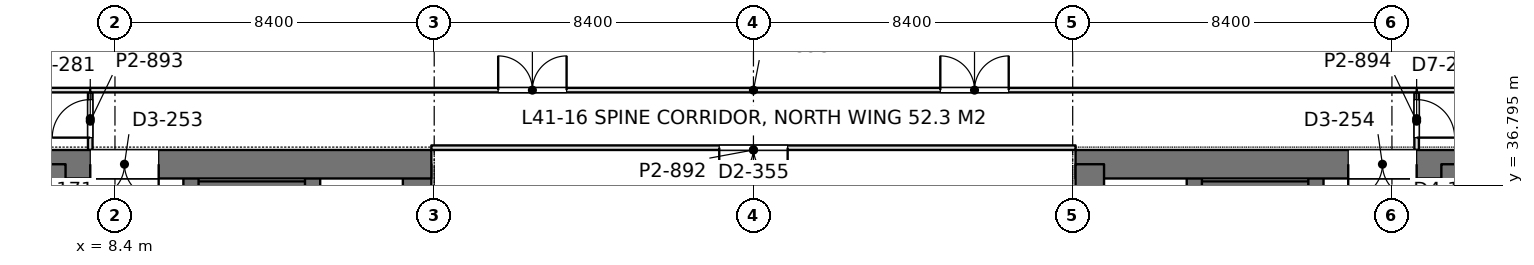
"""IFC4 building model, lengths in metres.
Left out: names, types, materials, properties, quantities, classifications, styles, units other than length and angle.
Written with IfcOpenShell. Run it as: python <this file> out.ifc"""

import sys

from ifc_helpers import new_model, si_unit, direction, frame, frame_2d, origin, place, context, subcontext, project, spatial, rectangle, extrude, element, fill, save


model = new_model("IFC4")
c1 = context("Model", 3, precision=1e-05, world=origin(), true_north=direction((0.0, 1.0)))
c2 = subcontext(c1, "Body", "Model", "MODEL_VIEW")
j1 = project(units=[si_unit("LENGTHUNIT", "METRE"), si_unit("PLANEANGLEUNIT", "RADIAN")], contexts=[c1])
p1 = place(None, origin())
s1 = spatial("IfcSite", under=j1, at=p1, CompositionType="ELEMENT")
p2 = place(p1, origin())
s2 = spatial("IfcBuilding", under=s1, at=p2, CompositionType="ELEMENT")
p3 = place(p2, frame((0.0, 0.0, 181.8)))
s3 = spatial("IfcBuildingStorey", under=s2, at=p3, CompositionType="ELEMENT", Elevation=181.8)
p4 = place(p3, frame((-1.125, 37.35, 0.0), z_axis=(0.0, 0.0, 1.0), x_axis=(1.0, 0.0, 0.0)))
e1 = element("IfcWall", 1, at=p4, inside=s3, PredefinedType="SHEAR", context=c2, shape_type="SweptSolid", body=[
    extrude(rectangle(XDim=17.85, YDim=0.75, at=frame_2d((8.925, 0.0))), origin(), (0.0, 0.0, 1.0), 4.2),
])
p5 = place(p4, frame((8.875, 0.0, 0.0)))
e2 = element("IfcOpeningElement", 2, at=p5, cuts=e1, PredefinedType="OPENING", context=c2, shape_type="SweptSolid", body=[
    extrude(rectangle(XDim=1.8, YDim=2.4, at=frame_2d((0.9, 1.2))), frame((0.0, 0.385, 0.0), z_axis=(0.0, -1.0, 0.0), x_axis=(1.0, 0.0, 0.0)), (0.0, 0.0, 1.0), 0.77),
])
p6 = place(p3, frame((16.35, 27.8, 0.0), z_axis=(0.0, 0.0, 1.0), x_axis=(0.0, 1.0, 0.0)))
e3 = element("IfcWall", 3, at=p6, inside=s3, PredefinedType="SHEAR", context=c2, shape_type="SweptSolid", body=[
    extrude(rectangle(XDim=9.55, YDim=0.75, at=frame_2d((4.775, 0.0))), origin(), (0.0, 0.0, 1.0), 4.2),
])
p7 = place(p3, frame((6.9, 13.05, 0.0), z_axis=(0.0, 0.0, 1.0), x_axis=(0.0, 1.0, 0.0)))
e4 = element("IfcWall", 4, at=p7, inside=s3, PredefinedType="SHEAR", context=c2, shape_type="SweptSolid", body=[
    extrude(rectangle(XDim=24.3, YDim=0.4, at=frame_2d((12.15, 0.0))), origin(), (0.0, 0.0, 1.0), 4.2),
])
p8 = place(p7, frame((1.3, 0.0, 0.0)))
e5 = element("IfcOpeningElement", 5, at=p8, cuts=e4, PredefinedType="OPENING", context=c2, shape_type="SweptSolid", body=[
    extrude(rectangle(XDim=1.0, YDim=2.2, at=frame_2d((0.5, 1.1))), frame((0.0, 0.21, 0.0), z_axis=(0.0, -1.0, 0.0), x_axis=(1.0, 0.0, 0.0)), (0.0, 0.0, 1.0), 0.42),
])
p9 = place(p7, frame((22.0, 0.0, 0.0)))
e6 = element("IfcOpeningElement", 6, at=p9, cuts=e4, PredefinedType="OPENING", context=c2, shape_type="SweptSolid", body=[
    extrude(rectangle(XDim=1.0, YDim=2.2, at=frame_2d((0.5, 1.1))), frame((0.0, 0.21, 0.0), z_axis=(0.0, -1.0, 0.0), x_axis=(1.0, 0.0, 0.0)), (0.0, 0.0, 1.0), 0.42),
])
p10 = place(p7, frame((5.55, 0.0, 0.0)))
e7 = element("IfcOpeningElement", 7, at=p10, cuts=e4, PredefinedType="OPENING", context=c2, shape_type="SweptSolid", body=[
    extrude(rectangle(XDim=1.0, YDim=2.2, at=frame_2d((0.5, 1.1))), frame((0.0, 0.21, 0.0), z_axis=(0.0, -1.0, 0.0), x_axis=(1.0, 0.0, 0.0)), (0.0, 0.0, 1.0), 0.42),
])
p11 = place(p7, frame((9.55, 0.0, 0.0)))
e8 = element("IfcOpeningElement", 8, at=p11, cuts=e4, PredefinedType="OPENING", context=c2, shape_type="SweptSolid", body=[
    extrude(rectangle(XDim=1.0, YDim=2.2, at=frame_2d((0.5, 1.1))), frame((0.0, 0.21, 0.0), z_axis=(0.0, -1.0, 0.0), x_axis=(1.0, 0.0, 0.0)), (0.0, 0.0, 1.0), 0.42),
])
p12 = place(p7, frame((12.8, 0.0, 0.0)))
e9 = element("IfcOpeningElement", 9, at=p12, cuts=e4, PredefinedType="OPENING", context=c2, shape_type="SweptSolid", body=[
    extrude(rectangle(XDim=1.1, YDim=2.2, at=frame_2d((0.55, 1.1))), frame((0.0, 0.21, 0.0), z_axis=(0.0, -1.0, 0.0), x_axis=(1.0, 0.0, 0.0)), (0.0, 0.0, 1.0), 0.42),
])
p13 = place(p7, frame((15.538, 0.0, 0.0)))
e10 = element("IfcOpeningElement", 10, at=p13, cuts=e4, PredefinedType="OPENING", context=c2, shape_type="SweptSolid", body=[
    extrude(rectangle(XDim=1.1, YDim=2.2, at=frame_2d((0.55, 1.1))), frame((0.0, 0.21, 0.0), z_axis=(0.0, -1.0, 0.0), x_axis=(1.0, 0.0, 0.0)), (0.0, 0.0, 1.0), 0.42),
])
p14 = place(p7, frame((18.262, 0.0, 0.0)))
e11 = element("IfcOpeningElement", 11, at=p14, cuts=e4, PredefinedType="OPENING", context=c2, shape_type="SweptSolid", body=[
    extrude(rectangle(XDim=1.1, YDim=2.2, at=frame_2d((0.55, 1.1))), frame((0.0, 0.21, 0.0), z_axis=(0.0, -1.0, 0.0), x_axis=(1.0, 0.0, 0.0)), (0.0, 0.0, 1.0), 0.42),
])
p15 = place(p3, frame((10.4, 13.05, 0.0), z_axis=(0.0, 0.0, 1.0), x_axis=(0.0, 1.0, 0.0)))
e12 = element("IfcWall", 12, at=p15, inside=s3, PredefinedType="SHEAR", context=c2, shape_type="SweptSolid", body=[
    extrude(rectangle(XDim=24.3, YDim=0.4, at=frame_2d((12.15, 0.0))), origin(), (0.0, 0.0, 1.0), 4.2),
])
p16 = place(p15, frame((15.75, 0.0, 0.0)))
e13 = element("IfcOpeningElement", 13, at=p16, cuts=e12, PredefinedType="OPENING", context=c2, shape_type="SweptSolid", body=[
    extrude(rectangle(XDim=1.1, YDim=2.2, at=frame_2d((0.55, 1.1))), frame((0.0, 0.21, 0.0), z_axis=(0.0, -1.0, 0.0), x_axis=(1.0, 0.0, 0.0)), (0.0, 0.0, 1.0), 0.42),
])
p17 = place(p15, frame((18.6, 0.0, 0.0)))
e14 = element("IfcOpeningElement", 14, at=p17, cuts=e12, PredefinedType="OPENING", context=c2, shape_type="SweptSolid", body=[
    extrude(rectangle(XDim=1.1, YDim=2.2, at=frame_2d((0.55, 1.1))), frame((0.0, 0.21, 0.0), z_axis=(0.0, -1.0, 0.0), x_axis=(1.0, 0.0, 0.0)), (0.0, 0.0, 1.0), 0.42),
])
p18 = place(p15, frame((21.45, 0.0, 0.0)))
e15 = element("IfcOpeningElement", 15, at=p18, cuts=e12, PredefinedType="OPENING", context=c2, shape_type="SweptSolid", body=[
    extrude(rectangle(XDim=1.1, YDim=2.2, at=frame_2d((0.55, 1.1))), frame((0.0, 0.21, 0.0), z_axis=(0.0, -1.0, 0.0), x_axis=(1.0, 0.0, 0.0)), (0.0, 0.0, 1.0), 0.42),
])
p19 = place(p15, frame((8.65, 0.0, 0.0)))
e16 = element("IfcOpeningElement", 16, at=p19, cuts=e12, PredefinedType="OPENING", context=c2, shape_type="SweptSolid", body=[
    extrude(rectangle(XDim=1.8, YDim=2.4, at=frame_2d((0.9, 1.2))), frame((0.0, 0.21, 0.0), z_axis=(0.0, -1.0, 0.0), x_axis=(1.0, 0.0, 0.0)), (0.0, 0.0, 1.0), 0.42),
])
p20 = place(p3, frame((13.6, 27.925, 0.0), z_axis=(0.0, 0.0, 1.0), x_axis=(0.0, 1.0, 0.0)))
e17 = element("IfcWall", 17, at=p20, inside=s3, PredefinedType="SHEAR", context=c2, shape_type="SweptSolid", body=[
    extrude(rectangle(XDim=9.425, YDim=0.4, at=frame_2d((4.712, 0.0))), origin(), (0.0, 0.0, 1.0), 4.2),
])
p21 = place(p3, frame((10.4, 36.625, 0.0), z_axis=(0.0, 0.0, 1.0), x_axis=(1.0, 0.0, 0.0)))
e18 = element("IfcWall", 18, at=p21, inside=s3, PredefinedType="SHEAR", context=c2, shape_type="SweptSolid", body=[
    extrude(rectangle(XDim=3.2, YDim=0.55, at=frame_2d((1.6, 0.0))), origin(), (0.0, 0.0, 1.0), 4.2),
])
p22 = place(p3, frame((33.675, 37.35, 0.0), z_axis=(0.0, 0.0, 1.0), x_axis=(1.0, 0.0, 0.0)))
e19 = element("IfcWall", 19, at=p22, inside=s3, PredefinedType="SHEAR", context=c2, shape_type="SweptSolid", body=[
    extrude(rectangle(XDim=17.85, YDim=0.75, at=frame_2d((8.925, 0.0))), origin(), (0.0, 0.0, 1.0), 4.2),
])
p23 = place(p22, frame((7.175, 0.0, 0.0)))
e20 = element("IfcOpeningElement", 20, at=p23, cuts=e19, PredefinedType="OPENING", context=c2, shape_type="SweptSolid", body=[
    extrude(rectangle(XDim=1.8, YDim=2.4, at=frame_2d((0.9, 1.2))), frame((0.0, 0.385, 0.0), z_axis=(0.0, -1.0, 0.0), x_axis=(1.0, 0.0, 0.0)), (0.0, 0.0, 1.0), 0.77),
])
p24 = place(p3, frame((34.05, 27.8, 0.0), z_axis=(0.0, 0.0, 1.0), x_axis=(0.0, 1.0, 0.0)))
e21 = element("IfcWall", 21, at=p24, inside=s3, PredefinedType="SHEAR", context=c2, shape_type="SweptSolid", body=[
    extrude(rectangle(XDim=9.55, YDim=0.75, at=frame_2d((4.775, 0.0))), origin(), (0.0, 0.0, 1.0), 4.2),
])
p25 = place(p3, frame((43.5, 13.05, 0.0), z_axis=(0.0, 0.0, 1.0), x_axis=(0.0, 1.0, 0.0)))
e22 = element("IfcWall", 22, at=p25, inside=s3, PredefinedType="SHEAR", context=c2, shape_type="SweptSolid", body=[
    extrude(rectangle(XDim=24.3, YDim=0.4, at=frame_2d((12.15, 0.0))), origin(), (0.0, 0.0, 1.0), 4.2),
])
p26 = place(p25, frame((1.3, 0.0, 0.0)))
e23 = element("IfcOpeningElement", 23, at=p26, cuts=e22, PredefinedType="OPENING", context=c2, shape_type="SweptSolid", body=[
    extrude(rectangle(XDim=1.0, YDim=2.2, at=frame_2d((0.5, 1.1))), frame((0.0, 0.21, 0.0), z_axis=(0.0, -1.0, 0.0), x_axis=(1.0, 0.0, 0.0)), (0.0, 0.0, 1.0), 0.42),
])
p27 = place(p25, frame((22.0, 0.0, 0.0)))
e24 = element("IfcOpeningElement", 24, at=p27, cuts=e22, PredefinedType="OPENING", context=c2, shape_type="SweptSolid", body=[
    extrude(rectangle(XDim=1.0, YDim=2.2, at=frame_2d((0.5, 1.1))), frame((0.0, 0.21, 0.0), z_axis=(0.0, -1.0, 0.0), x_axis=(1.0, 0.0, 0.0)), (0.0, 0.0, 1.0), 0.42),
])
p28 = place(p25, frame((5.55, 0.0, 0.0)))
e25 = element("IfcOpeningElement", 25, at=p28, cuts=e22, PredefinedType="OPENING", context=c2, shape_type="SweptSolid", body=[
    extrude(rectangle(XDim=1.0, YDim=2.2, at=frame_2d((0.5, 1.1))), frame((0.0, 0.21, 0.0), z_axis=(0.0, -1.0, 0.0), x_axis=(1.0, 0.0, 0.0)), (0.0, 0.0, 1.0), 0.42),
])
p29 = place(p25, frame((9.55, 0.0, 0.0)))
e26 = element("IfcOpeningElement", 26, at=p29, cuts=e22, PredefinedType="OPENING", context=c2, shape_type="SweptSolid", body=[
    extrude(rectangle(XDim=1.0, YDim=2.2, at=frame_2d((0.5, 1.1))), frame((0.0, 0.21, 0.0), z_axis=(0.0, -1.0, 0.0), x_axis=(1.0, 0.0, 0.0)), (0.0, 0.0, 1.0), 0.42),
])
p30 = place(p25, frame((12.8, 0.0, 0.0)))
e27 = element("IfcOpeningElement", 27, at=p30, cuts=e22, PredefinedType="OPENING", context=c2, shape_type="SweptSolid", body=[
    extrude(rectangle(XDim=1.1, YDim=2.2, at=frame_2d((0.55, 1.1))), frame((0.0, 0.21, 0.0), z_axis=(0.0, -1.0, 0.0), x_axis=(1.0, 0.0, 0.0)), (0.0, 0.0, 1.0), 0.42),
])
p31 = place(p25, frame((15.538, 0.0, 0.0)))
e28 = element("IfcOpeningElement", 28, at=p31, cuts=e22, PredefinedType="OPENING", context=c2, shape_type="SweptSolid", body=[
    extrude(rectangle(XDim=1.1, YDim=2.2, at=frame_2d((0.55, 1.1))), frame((0.0, 0.21, 0.0), z_axis=(0.0, -1.0, 0.0), x_axis=(1.0, 0.0, 0.0)), (0.0, 0.0, 1.0), 0.42),
])
p32 = place(p25, frame((18.262, 0.0, 0.0)))
e29 = element("IfcOpeningElement", 29, at=p32, cuts=e22, PredefinedType="OPENING", context=c2, shape_type="SweptSolid", body=[
    extrude(rectangle(XDim=1.1, YDim=2.2, at=frame_2d((0.55, 1.1))), frame((0.0, 0.21, 0.0), z_axis=(0.0, -1.0, 0.0), x_axis=(1.0, 0.0, 0.0)), (0.0, 0.0, 1.0), 0.42),
])
p33 = place(p3, frame((40.0, 13.05, 0.0), z_axis=(0.0, 0.0, 1.0), x_axis=(0.0, 1.0, 0.0)))
e30 = element("IfcWall", 30, at=p33, inside=s3, PredefinedType="SHEAR", context=c2, shape_type="SweptSolid", body=[
    extrude(rectangle(XDim=24.3, YDim=0.4, at=frame_2d((12.15, 0.0))), origin(), (0.0, 0.0, 1.0), 4.2),
])
p34 = place(p33, frame((15.75, 0.0, 0.0)))
e31 = element("IfcOpeningElement", 31, at=p34, cuts=e30, PredefinedType="OPENING", context=c2, shape_type="SweptSolid", body=[
    extrude(rectangle(XDim=1.1, YDim=2.2, at=frame_2d((0.55, 1.1))), frame((0.0, 0.21, 0.0), z_axis=(0.0, -1.0, 0.0), x_axis=(1.0, 0.0, 0.0)), (0.0, 0.0, 1.0), 0.42),
])
p35 = place(p33, frame((18.6, 0.0, 0.0)))
e32 = element("IfcOpeningElement", 32, at=p35, cuts=e30, PredefinedType="OPENING", context=c2, shape_type="SweptSolid", body=[
    extrude(rectangle(XDim=1.1, YDim=2.2, at=frame_2d((0.55, 1.1))), frame((0.0, 0.21, 0.0), z_axis=(0.0, -1.0, 0.0), x_axis=(1.0, 0.0, 0.0)), (0.0, 0.0, 1.0), 0.42),
])
p36 = place(p33, frame((21.45, 0.0, 0.0)))
e33 = element("IfcOpeningElement", 33, at=p36, cuts=e30, PredefinedType="OPENING", context=c2, shape_type="SweptSolid", body=[
    extrude(rectangle(XDim=1.1, YDim=2.2, at=frame_2d((0.55, 1.1))), frame((0.0, 0.21, 0.0), z_axis=(0.0, -1.0, 0.0), x_axis=(1.0, 0.0, 0.0)), (0.0, 0.0, 1.0), 0.42),
])
p37 = place(p33, frame((8.65, 0.0, 0.0)))
e34 = element("IfcOpeningElement", 34, at=p37, cuts=e30, PredefinedType="OPENING", context=c2, shape_type="SweptSolid", body=[
    extrude(rectangle(XDim=1.8, YDim=2.4, at=frame_2d((0.9, 1.2))), frame((0.0, 0.21, 0.0), z_axis=(0.0, -1.0, 0.0), x_axis=(1.0, 0.0, 0.0)), (0.0, 0.0, 1.0), 0.42),
])
p38 = place(p3, frame((36.8, 27.925, 0.0), z_axis=(0.0, 0.0, 1.0), x_axis=(0.0, 1.0, 0.0)))
e35 = element("IfcWall", 35, at=p38, inside=s3, PredefinedType="SHEAR", context=c2, shape_type="SweptSolid", body=[
    extrude(rectangle(XDim=9.425, YDim=0.4, at=frame_2d((4.712, 0.0))), origin(), (0.0, 0.0, 1.0), 4.2),
])
p39 = place(p3, frame((40.0, 36.625, 0.0), z_axis=(0.0, 0.0, 1.0), x_axis=(-1.0, 0.0, 0.0)))
e36 = element("IfcWall", 36, at=p39, inside=s3, PredefinedType="SHEAR", context=c2, shape_type="SweptSolid", body=[
    extrude(rectangle(XDim=3.2, YDim=0.55, at=frame_2d((1.6, 0.0))), origin(), (0.0, 0.0, 1.0), 4.2),
])
p40 = place(p3, frame((7.748, 39.3, 0.0), z_axis=(0.0, 0.0, 1.0), x_axis=(1.0, 0.0, 0.0)))
e37 = element("IfcWall", 37, at=p40, inside=s3, PredefinedType="PARTITIONING", context=c2, shape_type="SweptSolid", body=[
    extrude(rectangle(XDim=34.904, YDim=0.12, at=frame_2d((17.452, 0.0))), origin(), (0.0, 0.0, 1.0), 3.55),
])
p41 = place(p40, frame((10.735, 0.0, 0.0)))
e38 = element("IfcOpeningElement", 38, at=p41, cuts=e37, PredefinedType="OPENING", context=c2, shape_type="SweptSolid", body=[
    extrude(rectangle(XDim=1.8, YDim=2.2, at=frame_2d((0.9, 1.1))), frame((0.0, 0.07, 0.0), z_axis=(0.0, -1.0, 0.0), x_axis=(1.0, 0.0, 0.0)), (0.0, 0.0, 1.0), 0.14),
])
p42 = place(p40, frame((22.369, 0.0, 0.0)))
e39 = element("IfcOpeningElement", 39, at=p42, cuts=e37, PredefinedType="OPENING", context=c2, shape_type="SweptSolid", body=[
    extrude(rectangle(XDim=1.8, YDim=2.2, at=frame_2d((0.9, 1.1))), frame((0.0, 0.07, 0.0), z_axis=(0.0, -1.0, 0.0), x_axis=(1.0, 0.0, 0.0)), (0.0, 0.0, 1.0), 0.14),
])
p43 = place(p3, frame((7.75, 37.724, 0.0), z_axis=(0.0, 0.0, 1.0), x_axis=(0.0, 1.0, 0.0)))
e40 = element("IfcWall", 40, at=p43, inside=s3, PredefinedType="PARTITIONING", context=c2, shape_type="SweptSolid", body=[
    extrude(rectangle(XDim=1.518, YDim=0.12, at=frame_2d((0.759, 0.0))), origin(), (0.0, 0.0, 1.0), 4.05),
])
p44 = place(p43, frame((0.326, 0.0, 0.0)))
e41 = element("IfcOpeningElement", 41, at=p44, cuts=e40, PredefinedType="OPENING", context=c2, shape_type="SweptSolid", body=[
    extrude(rectangle(XDim=1.0, YDim=2.4, at=frame_2d((0.5, 1.2))), frame((0.0, 0.07, 0.0), z_axis=(0.0, -1.0, 0.0), x_axis=(1.0, 0.0, 0.0)), (0.0, 0.0, 1.0), 0.14),
])
p45 = place(p3, frame((42.65, 37.724, 0.0), z_axis=(0.0, 0.0, 1.0), x_axis=(0.0, 1.0, 0.0)))
e42 = element("IfcWall", 42, at=p45, inside=s3, PredefinedType="PARTITIONING", context=c2, shape_type="SweptSolid", body=[
    extrude(rectangle(XDim=1.518, YDim=0.12, at=frame_2d((0.759, 0.0))), origin(), (0.0, 0.0, 1.0), 4.05),
])
p46 = place(p45, frame((0.326, 0.0, 0.0)))
e43 = element("IfcOpeningElement", 43, at=p46, cuts=e42, PredefinedType="OPENING", context=c2, shape_type="SweptSolid", body=[
    extrude(rectangle(XDim=1.0, YDim=2.4, at=frame_2d((0.5, 1.2))), frame((0.0, 0.07, 0.0), z_axis=(0.0, -1.0, 0.0), x_axis=(1.0, 0.0, 0.0)), (0.0, 0.0, 1.0), 0.14),
])
for number, where, z_axis, x_axis in (
    (44, (1.2, 39.3, 0.0), (0.0, 0.0, 1.0), (1.0, 0.0, 0.0)),
    (45, (42.648, 39.3, 0.0), (0.0, 0.0, 1.0), (1.0, 0.0, 0.0)),
):
    element("IfcWall", number, at=place(p3, frame(where, z_axis=z_axis, x_axis=x_axis)), inside=s3, PredefinedType="PARTITIONING", context=c2, shape_type="SweptSolid", body=[
        extrude(rectangle(XDim=6.552, YDim=0.12, at=frame_2d((3.276, 0.0))), origin(), (0.0, 0.0, 1.0), 3.69),
    ])
p47 = place(p3, frame((16.725, 37.785, 0.0), z_axis=(0.0, 0.0, 1.0), x_axis=(1.0, 0.0, 0.0)))
e46 = element("IfcWall", 46, at=p47, inside=s3, PredefinedType="PARTITIONING", context=c2, shape_type="SweptSolid", body=[
    extrude(rectangle(XDim=16.95, YDim=0.12, at=frame_2d((8.475, 0.0))), origin(), (0.0, 0.0, 1.0), 3.55),
])
p48 = place(p47, frame((7.575, 0.0, 0.0)))
e47 = element("IfcOpeningElement", 47, at=p48, cuts=e46, PredefinedType="OPENING", context=c2, shape_type="SweptSolid", body=[
    extrude(rectangle(XDim=1.8, YDim=2.2, at=frame_2d((0.9, 1.1))), frame((0.0, 0.07, 0.0), z_axis=(0.0, -1.0, 0.0), x_axis=(1.0, 0.0, 0.0)), (0.0, 0.0, 1.0), 0.14),
])
p49 = place(p5, frame((1.8, 0.0, 0.0), z_axis=(0.0, 0.0, 1.0), x_axis=(-1.0, 0.0, 0.0)))
e48 = element("IfcDoor", 48, at=p49, inside=s3, OperationType="DOUBLE_DOOR_SINGLE_SWING", PredefinedType="DOOR", context=c2, shape_type="SweptSolid", body=[
    extrude(rectangle(XDim=1.8, YDim=2.4, at=frame_2d((0.9, 1.2))), frame((0.0, 0.025, 0.0), z_axis=(0.0, -1.0, 0.0), x_axis=(1.0, 0.0, 0.0)), (0.0, 0.0, 1.0), 0.05),
])
fill(e2, e48)
p50 = place(p23, frame((1.8, 0.0, 0.0), z_axis=(0.0, 0.0, 1.0), x_axis=(-1.0, 0.0, 0.0)))
e49 = element("IfcDoor", 49, at=p50, inside=s3, OperationType="DOUBLE_DOOR_SINGLE_SWING", PredefinedType="DOOR", context=c2, shape_type="SweptSolid", body=[
    extrude(rectangle(XDim=1.8, YDim=2.4, at=frame_2d((0.9, 1.2))), frame((0.0, 0.025, 0.0), z_axis=(0.0, -1.0, 0.0), x_axis=(1.0, 0.0, 0.0)), (0.0, 0.0, 1.0), 0.05),
])
fill(e20, e49)
p51 = place(p41, origin())
e50 = element("IfcDoor", 50, at=p51, inside=s3, OperationType="DOUBLE_DOOR_SINGLE_SWING", PredefinedType="DOOR", context=c2, shape_type="SweptSolid", body=[
    extrude(rectangle(XDim=1.8, YDim=2.2, at=frame_2d((0.9, 1.1))), frame((0.0, 0.025, 0.0), z_axis=(0.0, -1.0, 0.0), x_axis=(1.0, 0.0, 0.0)), (0.0, 0.0, 1.0), 0.05),
])
fill(e38, e50)
p52 = place(p42, origin())
e51 = element("IfcDoor", 51, at=p52, inside=s3, OperationType="DOUBLE_DOOR_SINGLE_SWING", PredefinedType="DOOR", context=c2, shape_type="SweptSolid", body=[
    extrude(rectangle(XDim=1.8, YDim=2.2, at=frame_2d((0.9, 1.1))), frame((0.0, 0.025, 0.0), z_axis=(0.0, -1.0, 0.0), x_axis=(1.0, 0.0, 0.0)), (0.0, 0.0, 1.0), 0.05),
])
fill(e39, e51)
p53 = place(p44, origin())
e52 = element("IfcDoor", 52, at=p53, inside=s3, OperationType="SINGLE_SWING_LEFT", PredefinedType="DOOR", context=c2, shape_type="SweptSolid", body=[
    extrude(rectangle(XDim=1.0, YDim=2.4, at=frame_2d((0.5, 1.2))), frame((0.0, 0.025, 0.0), z_axis=(0.0, -1.0, 0.0), x_axis=(1.0, 0.0, 0.0)), (0.0, 0.0, 1.0), 0.05),
])
fill(e41, e52)
p54 = place(p46, frame((1.0, 0.0, 0.0), z_axis=(0.0, 0.0, 1.0), x_axis=(-1.0, 0.0, 0.0)))
e53 = element("IfcDoor", 53, at=p54, inside=s3, OperationType="SINGLE_SWING_RIGHT", PredefinedType="DOOR", context=c2, shape_type="SweptSolid", body=[
    extrude(rectangle(XDim=1.0, YDim=2.4, at=frame_2d((0.5, 1.2))), frame((0.0, 0.025, 0.0), z_axis=(0.0, -1.0, 0.0), x_axis=(1.0, 0.0, 0.0)), (0.0, 0.0, 1.0), 0.05),
])
fill(e43, e53)
p55 = place(p48, frame((1.8, 0.0, 0.0), z_axis=(0.0, 0.0, 1.0), x_axis=(-1.0, 0.0, 0.0)))
e54 = element("IfcDoor", 54, at=p55, inside=s3, OperationType="DOUBLE_DOOR_SINGLE_SWING", PredefinedType="DOOR", context=c2, shape_type="SweptSolid", body=[
    extrude(rectangle(XDim=1.8, YDim=2.2, at=frame_2d((0.9, 1.1))), frame((0.0, 0.025, 0.0), z_axis=(0.0, -1.0, 0.0), x_axis=(1.0, 0.0, 0.0)), (0.0, 0.0, 1.0), 0.05),
])
fill(e47, e54)
save(model, sys.argv[1])
